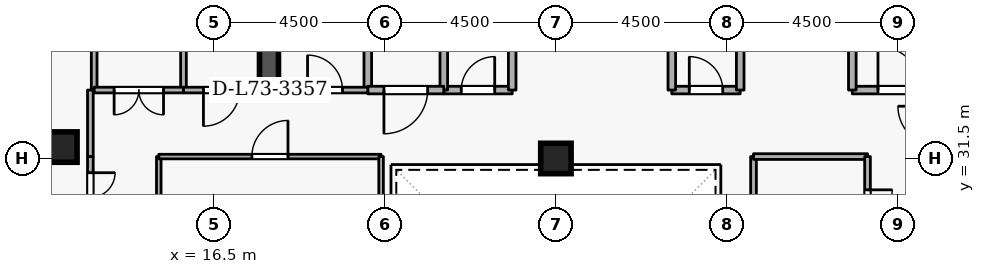
"""IFC4 building model, lengths in metres.
Left out: names, types, materials, properties, quantities, classifications, styles, units other than length and angle.
Written with IfcOpenShell. Run it as: python <this file> out.ifc"""

import sys

from ifc_helpers import new_model, si_unit, direction, frame, frame_2d, origin, origin_2d, place, context, subcontext, project, spatial, rectangle, extrude, element, fill, save


model = new_model("IFC4")
c1 = context("Model", 3, precision=1e-05, world=origin(), true_north=direction((0.0, 1.0)))
c2 = subcontext(c1, "Body", "Model", "MODEL_VIEW")
j1 = project(units=[si_unit("LENGTHUNIT", "METRE"), si_unit("PLANEANGLEUNIT", "RADIAN")], contexts=[c1])
p1 = place(None, origin())
s1 = spatial("IfcSite", under=j1, at=p1, CompositionType="ELEMENT")
p2 = place(p1, origin())
s2 = spatial("IfcBuilding", under=s1, at=p2, CompositionType="ELEMENT")
p3 = place(p2, frame((0.0, 0.0, 272.7)))
s3 = spatial("IfcBuildingStorey", under=s2, at=p3, CompositionType="ELEMENT", Elevation=272.7)
p4 = place(p3, frame((17.95, 33.1, 0.0), z_axis=(0.0, 0.0, 1.0), x_axis=(0.0, 1.0, 0.0)))
e1 = element("IfcWall", 1, at=p4, inside=s3, PredefinedType="SHEAR", context=c2, shape_type="SweptSolid", body=[
    extrude(rectangle(XDim=5.8, YDim=0.5, at=frame_2d((2.9, 0.0))), origin(), (0.0, 0.0, 1.0), 3.6),
])
for number, where, z_axis, x_axis in (
    (2, (12.5, 31.8, 0.0), (0.0, 0.0, 1.0), (1.0, 0.0, 0.0)),
    (3, (25.5, 31.5, 0.0), (0.0, 0.0, 1.0), (1.0, 0.0, 0.0)),
):
    element("IfcColumn", number, at=place(p3, frame(where, z_axis=z_axis, x_axis=x_axis)), inside=s3, PredefinedType="COLUMN", context=c2, shape_type="SweptSolid", body=[
        extrude(rectangle(XDim=0.8, YDim=0.8, at=origin_2d()), origin(), (0.0, 0.0, 1.0), 3.6),
    ])
p5 = place(p3, frame((33.3, 33.3, 0.0), z_axis=(0.0, 0.0, 1.0), x_axis=(1.0, 0.0, 0.0)))
e4 = element("IfcWall", 4, at=p5, inside=s3, PredefinedType="STANDARD", context=c2, shape_type="SweptSolid", body=[
    extrude(rectangle(XDim=2.5, YDim=0.2, at=frame_2d((1.25, 0.0))), origin(), (0.0, 0.0, 1.0), 3.34),
])
p6 = place(p5, frame((0.675, 0.0, 0.0)))
e5 = element("IfcOpeningElement", 5, at=p6, cuts=e4, PredefinedType="OPENING", context=c2, shape_type="SweptSolid", body=[
    extrude(rectangle(XDim=1.15, YDim=2.1, at=frame_2d((0.575, 1.05))), frame((0.0, 0.11, 0.0), z_axis=(0.0, -1.0, 0.0), x_axis=(1.0, 0.0, 0.0)), (0.0, 0.0, 1.0), 0.22),
])
p7 = place(p3, frame((33.3, 35.6, 0.0), z_axis=(0.0, 0.0, 1.0), x_axis=(0.0, -1.0, 0.0)))
e6 = element("IfcWall", 6, at=p7, inside=s3, PredefinedType="STANDARD", context=c2, shape_type="SweptSolid", body=[
    extrude(rectangle(XDim=2.3, YDim=0.2, at=frame_2d((1.15, 0.0))), origin(), (0.0, 0.0, 1.0), 2.545),
])
p8 = place(p3, frame((22.55, 33.3, 0.0), z_axis=(0.0, 0.0, 1.0), x_axis=(1.0, 0.0, 0.0)))
e7 = element("IfcWall", 7, at=p8, inside=s3, PredefinedType="STANDARD", context=c2, shape_type="SweptSolid", body=[
    extrude(rectangle(XDim=1.8, YDim=0.2, at=frame_2d((0.9, 0.0))), origin(), (0.0, 0.0, 1.0), 3.34),
])
p9 = place(p8, frame((0.46, 0.0, 0.0)))
e8 = element("IfcOpeningElement", 8, at=p9, cuts=e7, PredefinedType="OPENING", context=c2, shape_type="SweptSolid", body=[
    extrude(rectangle(XDim=0.88, YDim=2.04, at=frame_2d((0.44, 1.02))), frame((0.0, 0.11, 0.0), z_axis=(0.0, -1.0, 0.0), x_axis=(1.0, 0.0, 0.0)), (0.0, 0.0, 1.0), 0.22),
])
for number, where, z_axis, x_axis in (
    (9, (24.35, 33.3, 0.0), (0.0, 0.0, 1.0), (0.0, 1.0, 0.0)),
    (10, (22.55, 35.35, 0.0), (0.0, 0.0, 1.0), (0.0, -1.0, 0.0)),
):
    element("IfcWall", number, at=place(p3, frame(where, z_axis=z_axis, x_axis=x_axis)), inside=s3, PredefinedType="STANDARD", context=c2, shape_type="SweptSolid", body=[
        extrude(rectangle(XDim=2.05, YDim=0.2, at=frame_2d((1.025, 0.0))), origin(), (0.0, 0.0, 1.0), 3.34),
    ])
p10 = place(p3, frame((28.55, 33.3, 0.0), z_axis=(0.0, 0.0, 1.0), x_axis=(1.0, 0.0, 0.0)))
e11 = element("IfcWall", 11, at=p10, inside=s3, PredefinedType="STANDARD", context=c2, shape_type="SweptSolid", body=[
    extrude(rectangle(XDim=1.8, YDim=0.2, at=frame_2d((0.9, 0.0))), origin(), (0.0, 0.0, 1.0), 3.34),
])
p11 = place(p10, frame((0.46, 0.0, 0.0)))
e12 = element("IfcOpeningElement", 12, at=p11, cuts=e11, PredefinedType="OPENING", context=c2, shape_type="SweptSolid", body=[
    extrude(rectangle(XDim=0.88, YDim=2.04, at=frame_2d((0.44, 1.02))), frame((0.0, 0.11, 0.0), z_axis=(0.0, -1.0, 0.0), x_axis=(1.0, 0.0, 0.0)), (0.0, 0.0, 1.0), 0.22),
])
for number, where, z_axis, x_axis in (
    (13, (30.35, 33.3, 0.0), (0.0, 0.0, 1.0), (0.0, 1.0, 0.0)),
    (14, (28.55, 35.35, 0.0), (0.0, 0.0, 1.0), (0.0, -1.0, 0.0)),
    (15, (20.55, 33.3, 0.0), (0.0, 0.0, 1.0), (0.0, 1.0, 0.0)),
):
    element("IfcWall", number, at=place(p3, frame(where, z_axis=z_axis, x_axis=x_axis)), inside=s3, PredefinedType="STANDARD", context=c2, shape_type="SweptSolid", body=[
        extrude(rectangle(XDim=2.05, YDim=0.2, at=frame_2d((1.025, 0.0))), origin(), (0.0, 0.0, 1.0), 3.34),
    ])
p12 = place(p3, frame((22.55, 33.3, 0.0), z_axis=(0.0, 0.0, 1.0), x_axis=(-1.0, 0.0, 0.0)))
e16 = element("IfcWall", 16, at=p12, inside=s3, PredefinedType="STANDARD", context=c2, shape_type="SweptSolid", body=[
    extrude(rectangle(XDim=2.0, YDim=0.2, at=frame_2d((1.0, 0.0))), origin(), (0.0, 0.0, 1.0), 3.34),
])
p13 = place(p12, frame((0.425, 0.0, 0.0)))
e17 = element("IfcOpeningElement", 17, at=p13, cuts=e16, PredefinedType="OPENING", context=c2, shape_type="SweptSolid", body=[
    extrude(rectangle(XDim=1.15, YDim=2.1, at=frame_2d((0.575, 1.05))), frame((0.0, 0.11, 0.0), z_axis=(0.0, -1.0, 0.0), x_axis=(1.0, 0.0, 0.0)), (0.0, 0.0, 1.0), 0.22),
])
p14 = place(p3, frame((18.3, 33.3, 0.0), z_axis=(0.0, 0.0, 1.0), x_axis=(1.0, 0.0, 0.0)))
e18 = element("IfcWall", 18, at=p14, inside=s3, PredefinedType="PARTITIONING", context=c2, shape_type="SweptSolid", body=[
    extrude(rectangle(XDim=2.25, YDim=0.15, at=frame_2d((1.125, 0.0))), origin(), (0.0, 0.0, 1.0), 3.34),
])
p15 = place(p14, frame((0.665, 0.0, 0.0)))
e19 = element("IfcOpeningElement", 19, at=p15, cuts=e18, PredefinedType="OPENING", context=c2, shape_type="SweptSolid", body=[
    extrude(rectangle(XDim=0.92, YDim=2.08, at=frame_2d((0.46, 1.04))), frame((0.0, 0.085, 0.0), z_axis=(0.0, -1.0, 0.0), x_axis=(1.0, 0.0, 0.0)), (0.0, 0.0, 1.0), 0.17),
])
for number, where, z_axis, x_axis in (
    (20, (13.35, 33.3, 0.0), (0.0, 0.0, 1.0), (0.0, 1.0, 0.0)),
    (21, (15.7, 44.72, 0.0), (0.0, 0.0, 1.0), (0.0, -1.0, 0.0)),
):
    element("IfcWall", number, at=place(p3, frame(where, z_axis=z_axis, x_axis=x_axis)), inside=s3, PredefinedType="PARTITIONING", context=c2, shape_type="SweptSolid", body=[
        extrude(rectangle(XDim=11.42, YDim=0.15, at=frame_2d((5.71, 0.0))), origin(), (0.0, 0.0, 1.0), 3.34),
    ])
p16 = place(p3, frame((15.7, 33.3, 0.0), z_axis=(0.0, 0.0, 1.0), x_axis=(-1.0, 0.0, 0.0)))
e22 = element("IfcWall", 22, at=p16, inside=s3, PredefinedType="PARTITIONING", context=c2, shape_type="SweptSolid", body=[
    extrude(rectangle(XDim=2.35, YDim=0.15, at=frame_2d((1.175, 0.0))), origin(), (0.0, 0.0, 1.0), 3.34),
])
p17 = place(p16, frame((0.525, 0.0, 0.0)))
e23 = element("IfcOpeningElement", 23, at=p17, cuts=e22, PredefinedType="OPENING", context=c2, shape_type="SweptSolid", body=[
    extrude(rectangle(XDim=1.3, YDim=2.12, at=frame_2d((0.65, 1.06))), frame((0.0, 0.085, 0.0), z_axis=(0.0, -1.0, 0.0), x_axis=(1.0, 0.0, 0.0)), (0.0, 0.0, 1.0), 0.17),
])
p18 = place(p3, frame((17.7, 33.3, 0.0), z_axis=(0.0, 0.0, 1.0), x_axis=(-1.0, 0.0, 0.0)))
e24 = element("IfcWall", 24, at=p18, inside=s3, PredefinedType="PARTITIONING", context=c2, shape_type="SweptSolid", body=[
    extrude(rectangle(XDim=2.0, YDim=0.15, at=frame_2d((1.0, 0.0))), origin(), (0.0, 0.0, 1.0), 3.34),
])
p19 = place(p18, frame((0.525, 0.0, 0.0)))
e25 = element("IfcOpeningElement", 25, at=p19, cuts=e24, PredefinedType="OPENING", context=c2, shape_type="SweptSolid", body=[
    extrude(rectangle(XDim=0.95, YDim=2.1, at=frame_2d((0.475, 1.05))), frame((0.0, 0.085, 0.0), z_axis=(0.0, -1.0, 0.0), x_axis=(1.0, 0.0, 0.0)), (0.0, 0.0, 1.0), 0.17),
])
p20 = place(p3, frame((13.25, 33.3, 0.0), z_axis=(0.0, 0.0, 1.0), x_axis=(0.0, -1.0, 0.0)))
e26 = element("IfcWall", 26, at=p20, inside=s3, PredefinedType="PARTITIONING", context=c2, shape_type="SweptSolid", body=[
    extrude(rectangle(XDim=1.75, YDim=0.15, at=frame_2d((0.875, 0.0))), origin(), (0.0, 0.0, 1.0), 3.34),
])
p21 = place(p3, frame((13.25, 31.55, 0.0), z_axis=(0.0, 0.0, 1.0), x_axis=(0.0, -1.0, 0.0)))
e27 = element("IfcWall", 27, at=p21, inside=s3, PredefinedType="PARTITIONING", context=c2, shape_type="SweptSolid", body=[
    extrude(rectangle(XDim=2.15, YDim=0.15, at=frame_2d((1.075, 0.0))), origin(), (0.0, 0.0, 1.0), 3.34),
])
p22 = place(p21, frame((0.425, 0.0, 0.0)))
e28 = element("IfcOpeningElement", 28, at=p22, cuts=e27, PredefinedType="OPENING", context=c2, shape_type="SweptSolid", body=[
    extrude(rectangle(XDim=1.3, YDim=2.12, at=frame_2d((0.65, 1.06))), frame((0.0, 0.085, 0.0), z_axis=(0.0, -1.0, 0.0), x_axis=(1.0, 0.0, 0.0)), (0.0, 0.0, 1.0), 0.17),
])
p23 = place(p3, frame((15.05, 26.2, 0.0), z_axis=(0.0, 0.0, 1.0), x_axis=(0.0, 1.0, 0.0)))
e29 = element("IfcWall", 29, at=p23, inside=s3, PredefinedType="PARTITIONING", context=c2, shape_type="SweptSolid", body=[
    extrude(rectangle(XDim=5.35, YDim=0.12, at=frame_2d((2.675, 0.0))), origin(), (0.0, 0.0, 1.0), 3.34),
])
p24 = place(p3, frame((15.05, 31.55, 0.0), z_axis=(0.0, 0.0, 1.0), x_axis=(1.0, 0.0, 0.0)))
e30 = element("IfcWall", 30, at=p24, inside=s3, PredefinedType="PARTITIONING", context=c2, shape_type="SweptSolid", body=[
    extrude(rectangle(XDim=5.85, YDim=0.12, at=frame_2d((2.925, 0.0))), origin(), (0.0, 0.0, 1.0), 3.34),
])
p25 = place(p24, frame((2.45, 0.0, 0.0)))
e31 = element("IfcOpeningElement", 31, at=p25, cuts=e30, PredefinedType="OPENING", context=c2, shape_type="SweptSolid", body=[
    extrude(rectangle(XDim=0.95, YDim=2.1, at=frame_2d((0.475, 1.05))), frame((0.0, 0.07, 0.0), z_axis=(0.0, -1.0, 0.0), x_axis=(1.0, 0.0, 0.0)), (0.0, 0.0, 1.0), 0.14),
])
p26 = place(p3, frame((20.9, 31.55, 0.0), z_axis=(0.0, 0.0, 1.0), x_axis=(0.0, -1.0, 0.0)))
e32 = element("IfcWall", 32, at=p26, inside=s3, PredefinedType="PARTITIONING", context=c2, shape_type="SweptSolid", body=[
    extrude(rectangle(XDim=5.35, YDim=0.12, at=frame_2d((2.675, 0.0))), origin(), (0.0, 0.0, 1.0), 3.34),
])
p27 = place(p3, frame((30.7, 28.5, 0.0), z_axis=(0.0, 0.0, 1.0), x_axis=(0.0, 1.0, 0.0)))
e33 = element("IfcWall", 33, at=p27, inside=s3, PredefinedType="PARTITIONING", context=c2, shape_type="SweptSolid", body=[
    extrude(rectangle(XDim=3.05, YDim=0.15, at=frame_2d((1.525, 0.0))), origin(), (0.0, 0.0, 1.0), 3.34),
])
p28 = place(p3, frame((30.7, 31.55, 0.0), z_axis=(0.0, 0.0, 1.0), x_axis=(1.0, 0.0, 0.0)))
e34 = element("IfcWall", 34, at=p28, inside=s3, PredefinedType="PARTITIONING", context=c2, shape_type="SweptSolid", body=[
    extrude(rectangle(XDim=3.0, YDim=0.15, at=frame_2d((1.5, 0.0))), origin(), (0.0, 0.0, 1.0), 3.34),
])
p29 = place(p3, frame((33.7, 31.55, 0.0), z_axis=(0.0, 0.0, 1.0), x_axis=(0.0, -1.0, 0.0)))
e35 = element("IfcWall", 35, at=p29, inside=s3, PredefinedType="PARTITIONING", context=c2, shape_type="SweptSolid", body=[
    extrude(rectangle(XDim=3.05, YDim=0.15, at=frame_2d((1.525, 0.0))), origin(), (0.0, 0.0, 1.0), 3.34),
])
p30 = place(p29, frame((0.875, 0.0, 0.0)))
e36 = element("IfcOpeningElement", 36, at=p30, cuts=e35, PredefinedType="OPENING", context=c2, shape_type="SweptSolid", body=[
    extrude(rectangle(XDim=1.3, YDim=2.12, at=frame_2d((0.65, 1.06))), frame((0.0, 0.085, 0.0), z_axis=(0.0, -1.0, 0.0), x_axis=(1.0, 0.0, 0.0)), (0.0, 0.0, 1.0), 0.17),
])
p31 = place(p6, origin())
e37 = element("IfcDoor", 37, at=p31, inside=s3, OperationType="SINGLE_SWING_LEFT", PredefinedType="DOOR", context=c2, shape_type="SweptSolid", body=[
    extrude(rectangle(XDim=1.15, YDim=2.1, at=frame_2d((0.575, 1.05))), frame((0.0, 0.025, 0.0), z_axis=(0.0, -1.0, 0.0), x_axis=(1.0, 0.0, 0.0)), (0.0, 0.0, 1.0), 0.05),
])
fill(e5, e37)
p32 = place(p9, origin())
e38 = element("IfcDoor", 38, at=p32, inside=s3, OperationType="SINGLE_SWING_RIGHT", PredefinedType="DOOR", context=c2, shape_type="SweptSolid", body=[
    extrude(rectangle(XDim=0.88, YDim=2.04, at=frame_2d((0.44, 1.02))), frame((0.0, 0.025, 0.0), z_axis=(0.0, -1.0, 0.0), x_axis=(1.0, 0.0, 0.0)), (0.0, 0.0, 1.0), 0.05),
])
fill(e8, e38)
p33 = place(p11, origin())
e39 = element("IfcDoor", 39, at=p33, inside=s3, OperationType="SINGLE_SWING_LEFT", PredefinedType="DOOR", context=c2, shape_type="SweptSolid", body=[
    extrude(rectangle(XDim=0.88, YDim=2.04, at=frame_2d((0.44, 1.02))), frame((0.0, 0.025, 0.0), z_axis=(0.0, -1.0, 0.0), x_axis=(1.0, 0.0, 0.0)), (0.0, 0.0, 1.0), 0.05),
])
fill(e12, e39)
p34 = place(p15, origin())
e40 = element("IfcDoor", 40, at=p34, inside=s3, OperationType="SINGLE_SWING_LEFT", PredefinedType="DOOR", context=c2, shape_type="SweptSolid", body=[
    extrude(rectangle(XDim=0.92, YDim=2.08, at=frame_2d((0.46, 1.04))), frame((0.0, 0.025, 0.0), z_axis=(0.0, -1.0, 0.0), x_axis=(1.0, 0.0, 0.0)), (0.0, 0.0, 1.0), 0.05),
])
fill(e19, e40)
p35 = place(p13, origin())
e41 = element("IfcDoor", 41, at=p35, inside=s3, OperationType="SINGLE_SWING_RIGHT", PredefinedType="DOOR", context=c2, shape_type="SweptSolid", body=[
    extrude(rectangle(XDim=1.15, YDim=2.1, at=frame_2d((0.575, 1.05))), frame((0.0, 0.025, 0.0), z_axis=(0.0, -1.0, 0.0), x_axis=(1.0, 0.0, 0.0)), (0.0, 0.0, 1.0), 0.05),
])
fill(e17, e41)
p36 = place(p17, origin())
e42 = element("IfcDoor", 42, at=p36, inside=s3, OperationType="DOUBLE_DOOR_SINGLE_SWING", PredefinedType="DOOR", context=c2, shape_type="SweptSolid", body=[
    extrude(rectangle(XDim=1.3, YDim=2.12, at=frame_2d((0.65, 1.06))), frame((0.0, 0.025, 0.0), z_axis=(0.0, -1.0, 0.0), x_axis=(1.0, 0.0, 0.0)), (0.0, 0.0, 1.0), 0.05),
])
fill(e23, e42)
p37 = place(p19, origin())
e43 = element("IfcDoor", 43, at=p37, inside=s3, OperationType="SINGLE_SWING_RIGHT", PredefinedType="DOOR", context=c2, shape_type="SweptSolid", body=[
    extrude(rectangle(XDim=0.95, YDim=2.1, at=frame_2d((0.475, 1.05))), frame((0.0, 0.025, 0.0), z_axis=(0.0, -1.0, 0.0), x_axis=(1.0, 0.0, 0.0)), (0.0, 0.0, 1.0), 0.05),
])
fill(e25, e43)
p38 = place(p22, origin())
e44 = element("IfcDoor", 44, at=p38, inside=s3, OperationType="DOUBLE_DOOR_SINGLE_SWING", PredefinedType="DOOR", context=c2, shape_type="SweptSolid", body=[
    extrude(rectangle(XDim=1.3, YDim=2.12, at=frame_2d((0.65, 1.06))), frame((0.0, 0.025, 0.0), z_axis=(0.0, -1.0, 0.0), x_axis=(1.0, 0.0, 0.0)), (0.0, 0.0, 1.0), 0.05),
])
fill(e28, e44)
p39 = place(p25, origin())
e45 = element("IfcDoor", 45, at=p39, inside=s3, OperationType="SINGLE_SWING_RIGHT", PredefinedType="DOOR", context=c2, shape_type="SweptSolid", body=[
    extrude(rectangle(XDim=0.95, YDim=2.1, at=frame_2d((0.475, 1.05))), frame((0.0, 0.025, 0.0), z_axis=(0.0, -1.0, 0.0), x_axis=(1.0, 0.0, 0.0)), (0.0, 0.0, 1.0), 0.05),
])
fill(e31, e45)
p40 = place(p30, origin())
e46 = element("IfcDoor", 46, at=p40, inside=s3, OperationType="DOUBLE_DOOR_SINGLE_SWING", PredefinedType="DOOR", context=c2, shape_type="SweptSolid", body=[
    extrude(rectangle(XDim=1.3, YDim=2.12, at=frame_2d((0.65, 1.06))), frame((0.0, 0.025, 0.0), z_axis=(0.0, -1.0, 0.0), x_axis=(1.0, 0.0, 0.0)), (0.0, 0.0, 1.0), 0.05),
])
fill(e36, e46)
save(model, sys.argv[1])
